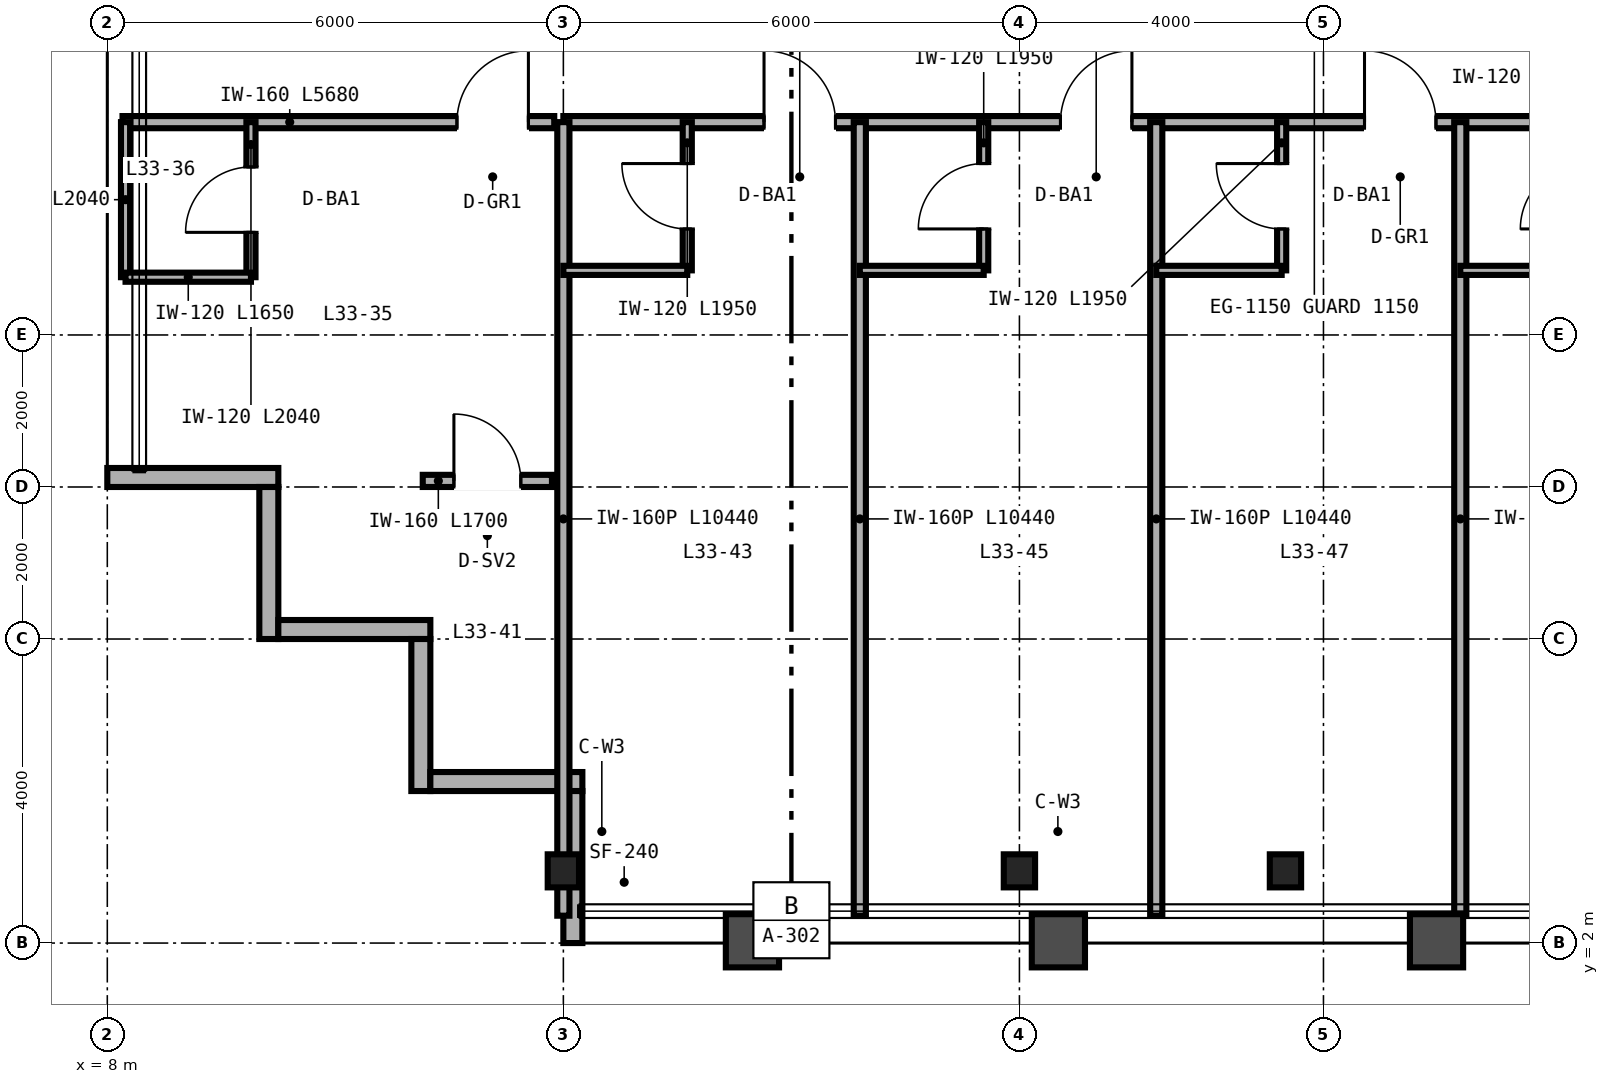
"""IFC4 building model, lengths in metres.
Left out: names, types, materials, properties, quantities, classifications, styles, units other than length and angle.
Written with IfcOpenShell. Run it as: python <this file> out.ifc"""

import sys

from ifc_helpers import new_model, si_unit, direction, frame, frame_2d, origin, origin_2d, place, context, subcontext, project, spatial, rectangle, i_section, extrude, source, transform, mapped, element, fill, save


model = new_model("IFC4")
c1 = context("Model", 3, precision=1e-05, world=origin(), true_north=direction((0.0, 1.0)))
c2 = subcontext(c1, "Body", "Model", "MODEL_VIEW")
j1 = project(units=[si_unit("LENGTHUNIT", "METRE"), si_unit("PLANEANGLEUNIT", "RADIAN")], contexts=[c1])
p1 = place(None, origin())
s1 = spatial("IfcSite", under=j1, at=p1, CompositionType="ELEMENT")
p2 = place(p1, origin())
s2 = spatial("IfcBuilding", under=s1, at=p2, CompositionType="ELEMENT")
p3 = place(p2, frame((0.0, 0.0, 133.2)))
s3 = spatial("IfcBuildingStorey", under=s2, at=p3, CompositionType="ELEMENT", Elevation=133.2)
m1 = source(origin(), c2, "Body", "SweptSolid", [
    extrude(i_section(OverallWidth=0.412, OverallDepth=0.435, WebThickness=0.036, FlangeThickness=0.057, FilletRadius=0.025, at=origin_2d()), origin(), (0.0, 0.0, 1.0), 3.36),
])
for number, where, z_axis, x_axis in (
    (1, (14.0, 2.95, 0.0), (0.0, 0.0, 1.0), (1.0, 0.0, 0.0)),
    (2, (20.0, 2.95, 0.0), (0.0, 0.0, 1.0), (1.0, 0.0, 0.0)),
    (3, (23.5, 2.95, 0.0), (0.0, 0.0, 1.0), (1.0, 0.0, 0.0)),
):
    element("IfcColumn", number, at=place(p3, frame(where, z_axis=z_axis, x_axis=x_axis)), inside=s3, PredefinedType="COLUMN", context=c2, shape_type="MappedRepresentation", body=[
        mapped(m1, transform((0.0, 0.0, 0.0), scale=1.0)),
    ])
p4 = place(p3, frame((8.0, 8.125, 0.0), z_axis=(0.0, 0.0, 1.0), x_axis=(1.0, 0.0, 0.0)))
e4 = element("IfcWall", 4, at=p4, inside=s3, PredefinedType="SOLIDWALL", context=c2, shape_type="SweptSolid", body=[
    extrude(rectangle(XDim=2.25, YDim=0.25, at=frame_2d((1.125, 0.0))), origin(), (0.0, 0.0, 1.0), 3.36),
])
for number, where, z_axis, x_axis in (
    (5, (10.125, 8.0, 0.0), (0.0, 0.0, 1.0), (0.0, -1.0, 0.0)),
    (6, (10.25, 6.125, 0.0), (0.0, 0.0, 1.0), (1.0, 0.0, 0.0)),
    (7, (12.125, 6.0, 0.0), (0.0, 0.0, 1.0), (0.0, -1.0, 0.0)),
    (8, (12.25, 4.125, 0.0), (0.0, 0.0, 1.0), (1.0, 0.0, 0.0)),
):
    element("IfcWall", number, at=place(p3, frame(where, z_axis=z_axis, x_axis=x_axis)), inside=s3, PredefinedType="SOLIDWALL", context=c2, shape_type="SweptSolid", body=[
        extrude(rectangle(XDim=2.0, YDim=0.25, at=frame_2d((1.0, 0.0))), origin(), (0.0, 0.0, 1.0), 3.36),
    ])
p5 = place(p3, frame((14.125, 4.0, 0.0), z_axis=(0.0, 0.0, 1.0), x_axis=(0.0, -1.0, 0.0)))
e9 = element("IfcWall", 9, at=p5, inside=s3, PredefinedType="SOLIDWALL", context=c2, shape_type="SweptSolid", body=[
    extrude(rectangle(XDim=2.0, YDim=0.25, at=frame_2d((1.0, 0.0))), origin(), (0.0, 0.0, 1.0), 2.667),
])
p6 = place(p3, frame((8.2, 12.8, 0.0), z_axis=(0.0, 0.0, 1.0), x_axis=(1.0, 0.0, 0.0)))
e10 = element("IfcWall", 10, at=p6, inside=s3, PredefinedType="PARTITIONING", context=c2, shape_type="SweptSolid", body=[
    extrude(rectangle(XDim=5.68, YDim=0.16, at=frame_2d((2.84, 0.0))), origin(), (0.0, 0.0, 1.0), 3.36),
])
p7 = place(p6, frame((4.4, 0.0, 0.0)))
e11 = element("IfcOpeningElement", 11, at=p7, cuts=e10, PredefinedType="OPENING", context=c2, shape_type="SweptSolid", body=[
    extrude(rectangle(XDim=0.94, YDim=2.15, at=frame_2d((0.47, 1.075))), frame((0.0, 0.09, 0.0), z_axis=(0.0, -1.0, 0.0), x_axis=(1.0, 0.0, 0.0)), (0.0, 0.0, 1.0), 0.18),
])
p8 = place(p3, frame((9.89, 10.76, 0.0), z_axis=(0.0, 0.0, 1.0), x_axis=(0.0, 1.0, 0.0)))
e12 = element("IfcWall", 12, at=p8, inside=s3, PredefinedType="PARTITIONING", context=c2, shape_type="SweptSolid", body=[
    extrude(rectangle(XDim=2.04, YDim=0.12, at=frame_2d((1.02, 0.0))), origin(), (0.0, 0.0, 1.0), 3.36),
])
p9 = place(p8, frame((0.59, 0.0, 0.0)))
e13 = element("IfcOpeningElement", 13, at=p9, cuts=e12, PredefinedType="OPENING", context=c2, shape_type="SweptSolid", body=[
    extrude(rectangle(XDim=0.86, YDim=2.1, at=frame_2d((0.43, 1.05))), frame((0.0, 0.07, 0.0), z_axis=(0.0, -1.0, 0.0), x_axis=(1.0, 0.0, 0.0)), (0.0, 0.0, 1.0), 0.14),
])
p10 = place(p3, frame((8.24, 10.76, 0.0), z_axis=(0.0, 0.0, 1.0), x_axis=(0.0, 1.0, 0.0)))
e14 = element("IfcWall", 14, at=p10, inside=s3, PredefinedType="PARTITIONING", context=c2, shape_type="SweptSolid", body=[
    extrude(rectangle(XDim=2.04, YDim=0.12, at=frame_2d((1.02, 0.0))), origin(), (0.0, 0.0, 1.0), 3.36),
])
p11 = place(p3, frame((8.24, 10.76, 0.0), z_axis=(0.0, 0.0, 1.0), x_axis=(1.0, 0.0, 0.0)))
e15 = element("IfcWall", 15, at=p11, inside=s3, PredefinedType="PARTITIONING", context=c2, shape_type="SweptSolid", body=[
    extrude(rectangle(XDim=1.65, YDim=0.12, at=frame_2d((0.825, 0.0))), origin(), (0.0, 0.0, 1.0), 3.36),
])
p12 = place(p3, frame((12.15, 8.08, 0.0), z_axis=(0.0, 0.0, 1.0), x_axis=(1.0, 0.0, 0.0)))
e16 = element("IfcWall", 16, at=p12, inside=s3, PredefinedType="PARTITIONING", context=c2, shape_type="SweptSolid", body=[
    extrude(rectangle(XDim=1.7, YDim=0.16, at=frame_2d((0.85, 0.0))), origin(), (0.0, 0.0, 1.0), 3.36),
])
p13 = place(p12, frame((0.41, 0.0, 0.0)))
e17 = element("IfcOpeningElement", 17, at=p13, cuts=e16, PredefinedType="OPENING", context=c2, shape_type="SweptSolid", body=[
    extrude(rectangle(XDim=0.88, YDim=2.15, at=frame_2d((0.44, 1.075))), frame((0.0, 0.09, 0.0), z_axis=(0.0, -1.0, 0.0), x_axis=(1.0, 0.0, 0.0)), (0.0, 0.0, 1.0), 0.18),
])
p14 = place(p3, frame((14.0, 12.8, 0.0), z_axis=(0.0, 0.0, 1.0), x_axis=(1.0, 0.0, 0.0)))
e18 = element("IfcWall", 18, at=p14, inside=s3, PredefinedType="PARTITIONING", context=c2, shape_type="SweptSolid", body=[
    extrude(rectangle(XDim=36.0, YDim=0.16, at=frame_2d((18.0, 0.0))), origin(), (0.0, 0.0, 1.0), 2.581),
])
p15 = place(p14, frame((2.64, 0.0, 0.0)))
e19 = element("IfcOpeningElement", 19, at=p15, cuts=e18, PredefinedType="OPENING", context=c2, shape_type="SweptSolid", body=[
    extrude(rectangle(XDim=0.94, YDim=2.15, at=frame_2d((0.47, 1.075))), frame((0.0, 0.09, 0.0), z_axis=(0.0, -1.0, 0.0), x_axis=(1.0, 0.0, 0.0)), (0.0, 0.0, 1.0), 0.18),
])
p16 = place(p14, frame((6.54, 0.0, 0.0)))
e20 = element("IfcOpeningElement", 20, at=p16, cuts=e18, PredefinedType="OPENING", context=c2, shape_type="SweptSolid", body=[
    extrude(rectangle(XDim=0.94, YDim=2.15, at=frame_2d((0.47, 1.075))), frame((0.0, 0.09, 0.0), z_axis=(0.0, -1.0, 0.0), x_axis=(1.0, 0.0, 0.0)), (0.0, 0.0, 1.0), 0.18),
])
p17 = place(p14, frame((10.54, 0.0, 0.0)))
e21 = element("IfcOpeningElement", 21, at=p17, cuts=e18, PredefinedType="OPENING", context=c2, shape_type="SweptSolid", body=[
    extrude(rectangle(XDim=0.94, YDim=2.15, at=frame_2d((0.47, 1.075))), frame((0.0, 0.09, 0.0), z_axis=(0.0, -1.0, 0.0), x_axis=(1.0, 0.0, 0.0)), (0.0, 0.0, 1.0), 0.18),
])
p18 = place(p14, frame((14.54, 0.0, 0.0)))
e22 = element("IfcOpeningElement", 22, at=p18, cuts=e18, PredefinedType="OPENING", context=c2, shape_type="SweptSolid", body=[
    extrude(rectangle(XDim=0.94, YDim=2.15, at=frame_2d((0.47, 1.075))), frame((0.0, 0.09, 0.0), z_axis=(0.0, -1.0, 0.0), x_axis=(1.0, 0.0, 0.0)), (0.0, 0.0, 1.0), 0.18),
])
p19 = place(p14, frame((18.54, 0.0, 0.0)))
e23 = element("IfcOpeningElement", 23, at=p19, cuts=e18, PredefinedType="OPENING", context=c2, shape_type="SweptSolid", body=[
    extrude(rectangle(XDim=0.94, YDim=2.15, at=frame_2d((0.47, 1.075))), frame((0.0, 0.09, 0.0), z_axis=(0.0, -1.0, 0.0), x_axis=(1.0, 0.0, 0.0)), (0.0, 0.0, 1.0), 0.18),
])
p20 = place(p14, frame((22.54, 0.0, 0.0)))
e24 = element("IfcOpeningElement", 24, at=p20, cuts=e18, PredefinedType="OPENING", context=c2, shape_type="SweptSolid", body=[
    extrude(rectangle(XDim=0.94, YDim=2.15, at=frame_2d((0.47, 1.075))), frame((0.0, 0.09, 0.0), z_axis=(0.0, -1.0, 0.0), x_axis=(1.0, 0.0, 0.0)), (0.0, 0.0, 1.0), 0.18),
])
p21 = place(p14, frame((26.54, 0.0, 0.0)))
e25 = element("IfcOpeningElement", 25, at=p21, cuts=e18, PredefinedType="OPENING", context=c2, shape_type="SweptSolid", body=[
    extrude(rectangle(XDim=0.94, YDim=2.15, at=frame_2d((0.47, 1.075))), frame((0.0, 0.09, 0.0), z_axis=(0.0, -1.0, 0.0), x_axis=(1.0, 0.0, 0.0)), (0.0, 0.0, 1.0), 0.18),
])
p22 = place(p14, frame((30.64, 0.0, 0.0)))
e26 = element("IfcOpeningElement", 26, at=p22, cuts=e18, PredefinedType="OPENING", context=c2, shape_type="SweptSolid", body=[
    extrude(rectangle(XDim=0.94, YDim=2.15, at=frame_2d((0.47, 1.075))), frame((0.0, 0.09, 0.0), z_axis=(0.0, -1.0, 0.0), x_axis=(1.0, 0.0, 0.0)), (0.0, 0.0, 1.0), 0.18),
])
p23 = place(p14, frame((34.74, 0.0, 0.0)))
e27 = element("IfcOpeningElement", 27, at=p23, cuts=e18, PredefinedType="OPENING", context=c2, shape_type="SweptSolid", body=[
    extrude(rectangle(XDim=0.94, YDim=2.15, at=frame_2d((0.47, 1.075))), frame((0.0, 0.09, 0.0), z_axis=(0.0, -1.0, 0.0), x_axis=(1.0, 0.0, 0.0)), (0.0, 0.0, 1.0), 0.18),
])
for number, where, z_axis, x_axis in (
    (28, (14.0, 2.36, 0.0), (0.0, 0.0, 1.0), (0.0, 1.0, 0.0)),
    (29, (17.9, 2.36, 0.0), (0.0, 0.0, 1.0), (0.0, 1.0, 0.0)),
):
    element("IfcWall", number, at=place(p3, frame(where, z_axis=z_axis, x_axis=x_axis)), inside=s3, PredefinedType="PARTITIONING", context=c2, shape_type="SweptSolid", body=[
        extrude(rectangle(XDim=10.44, YDim=0.16, at=frame_2d((5.22, 0.0))), origin(), (0.0, 0.0, 1.0), 2.667),
    ])
p24 = place(p3, frame((15.63, 10.85, 0.0), z_axis=(0.0, 0.0, 1.0), x_axis=(0.0, 1.0, 0.0)))
e30 = element("IfcWall", 30, at=p24, inside=s3, PredefinedType="PARTITIONING", context=c2, shape_type="SweptSolid", body=[
    extrude(rectangle(XDim=1.95, YDim=0.12, at=frame_2d((0.975, 0.0))), origin(), (0.0, 0.0, 1.0), 3.36),
])
p25 = place(p24, frame((0.545, 0.0, 0.0)))
e31 = element("IfcOpeningElement", 31, at=p25, cuts=e30, PredefinedType="OPENING", context=c2, shape_type="SweptSolid", body=[
    extrude(rectangle(XDim=0.86, YDim=2.1, at=frame_2d((0.43, 1.05))), frame((0.0, 0.07, 0.0), z_axis=(0.0, -1.0, 0.0), x_axis=(1.0, 0.0, 0.0)), (0.0, 0.0, 1.0), 0.14),
])
p26 = place(p3, frame((14.0, 10.85, 0.0), z_axis=(0.0, 0.0, 1.0), x_axis=(1.0, 0.0, 0.0)))
e32 = element("IfcWall", 32, at=p26, inside=s3, PredefinedType="PARTITIONING", context=c2, shape_type="SweptSolid", body=[
    extrude(rectangle(XDim=1.63, YDim=0.12, at=frame_2d((0.815, 0.0))), origin(), (0.0, 0.0, 1.0), 3.36),
])
p27 = place(p3, frame((21.8, 2.36, 0.0), z_axis=(0.0, 0.0, 1.0), x_axis=(0.0, 1.0, 0.0)))
e33 = element("IfcWall", 33, at=p27, inside=s3, PredefinedType="PARTITIONING", context=c2, shape_type="SweptSolid", body=[
    extrude(rectangle(XDim=10.44, YDim=0.16, at=frame_2d((5.22, 0.0))), origin(), (0.0, 0.0, 1.0), 2.823),
])
p28 = place(p3, frame((19.53, 10.85, 0.0), z_axis=(0.0, 0.0, 1.0), x_axis=(0.0, 1.0, 0.0)))
e34 = element("IfcWall", 34, at=p28, inside=s3, PredefinedType="PARTITIONING", context=c2, shape_type="SweptSolid", body=[
    extrude(rectangle(XDim=1.95, YDim=0.12, at=frame_2d((0.975, 0.0))), origin(), (0.0, 0.0, 1.0), 3.36),
])
p29 = place(p28, frame((0.545, 0.0, 0.0)))
e35 = element("IfcOpeningElement", 35, at=p29, cuts=e34, PredefinedType="OPENING", context=c2, shape_type="SweptSolid", body=[
    extrude(rectangle(XDim=0.86, YDim=2.1, at=frame_2d((0.43, 1.05))), frame((0.0, 0.07, 0.0), z_axis=(0.0, -1.0, 0.0), x_axis=(1.0, 0.0, 0.0)), (0.0, 0.0, 1.0), 0.14),
])
p30 = place(p3, frame((17.9, 10.85, 0.0), z_axis=(0.0, 0.0, 1.0), x_axis=(1.0, 0.0, 0.0)))
e36 = element("IfcWall", 36, at=p30, inside=s3, PredefinedType="PARTITIONING", context=c2, shape_type="SweptSolid", body=[
    extrude(rectangle(XDim=1.63, YDim=0.12, at=frame_2d((0.815, 0.0))), origin(), (0.0, 0.0, 1.0), 3.36),
])
p31 = place(p3, frame((25.8, 2.36, 0.0), z_axis=(0.0, 0.0, 1.0), x_axis=(0.0, 1.0, 0.0)))
e37 = element("IfcWall", 37, at=p31, inside=s3, PredefinedType="PARTITIONING", context=c2, shape_type="SweptSolid", body=[
    extrude(rectangle(XDim=10.44, YDim=0.16, at=frame_2d((5.22, 0.0))), origin(), (0.0, 0.0, 1.0), 2.433),
])
p32 = place(p3, frame((23.45, 10.85, 0.0), z_axis=(0.0, 0.0, 1.0), x_axis=(0.0, 1.0, 0.0)))
e38 = element("IfcWall", 38, at=p32, inside=s3, PredefinedType="PARTITIONING", context=c2, shape_type="SweptSolid", body=[
    extrude(rectangle(XDim=1.95, YDim=0.12, at=frame_2d((0.975, 0.0))), origin(), (0.0, 0.0, 1.0), 2.581),
])
p33 = place(p32, frame((0.545, 0.0, 0.0)))
e39 = element("IfcOpeningElement", 39, at=p33, cuts=e38, PredefinedType="OPENING", context=c2, shape_type="SweptSolid", body=[
    extrude(rectangle(XDim=0.86, YDim=2.1, at=frame_2d((0.43, 1.05))), frame((0.0, 0.07, 0.0), z_axis=(0.0, -1.0, 0.0), x_axis=(1.0, 0.0, 0.0)), (0.0, 0.0, 1.0), 0.14),
])
p34 = place(p3, frame((21.8, 10.85, 0.0), z_axis=(0.0, 0.0, 1.0), x_axis=(1.0, 0.0, 0.0)))
e40 = element("IfcWall", 40, at=p34, inside=s3, PredefinedType="PARTITIONING", context=c2, shape_type="SweptSolid", body=[
    extrude(rectangle(XDim=1.65, YDim=0.12, at=frame_2d((0.825, 0.0))), origin(), (0.0, 0.0, 1.0), 2.581),
])
p35 = place(p3, frame((25.8, 10.85, 0.0), z_axis=(0.0, 0.0, 1.0), x_axis=(1.0, 0.0, 0.0)))
e41 = element("IfcWall", 41, at=p35, inside=s3, PredefinedType="PARTITIONING", context=c2, shape_type="SweptSolid", body=[
    extrude(rectangle(XDim=1.65, YDim=0.12, at=frame_2d((0.825, 0.0))), origin(), (0.0, 0.0, 1.0), 3.36),
])
m2 = source(origin(), c2, "Body", "SweptSolid", [
    extrude(rectangle(XDim=0.86, YDim=2.1, at=frame_2d((0.43, 1.05))), frame((0.0, 0.025, 0.0), z_axis=(0.0, -1.0, 0.0), x_axis=(1.0, 0.0, 0.0)), (0.0, 0.0, 1.0), 0.05),
])
p36 = place(p9, origin())
e42 = element("IfcDoor", 42, at=p36, inside=s3, OperationType="SINGLE_SWING_LEFT", PredefinedType="DOOR", context=c2, shape_type="MappedRepresentation", body=[
    mapped(m2, transform((0.0, 0.0, 0.0), scale=1.0)),
])
fill(e13, e42)
m3 = source(origin(), c2, "Body", "SweptSolid", [
    extrude(rectangle(XDim=0.94, YDim=2.15, at=frame_2d((0.47, 1.075))), frame((0.0, 0.025, 0.0), z_axis=(0.0, -1.0, 0.0), x_axis=(1.0, 0.0, 0.0)), (0.0, 0.0, 1.0), 0.05),
])
p37 = place(p7, origin())
e43 = element("IfcDoor", 43, at=p37, inside=s3, OperationType="SINGLE_SWING_RIGHT", PredefinedType="DOOR", context=c2, shape_type="MappedRepresentation", body=[
    mapped(m3, transform((0.0, 0.0, 0.0), scale=1.0)),
])
fill(e11, e43)
m4 = source(origin(), c2, "Body", "SweptSolid", [
    extrude(rectangle(XDim=0.88, YDim=2.15, at=frame_2d((0.44, 1.075))), frame((0.0, 0.025, 0.0), z_axis=(0.0, -1.0, 0.0), x_axis=(1.0, 0.0, 0.0)), (0.0, 0.0, 1.0), 0.05),
])
p38 = place(p13, origin())
e44 = element("IfcDoor", 44, at=p38, inside=s3, OperationType="SINGLE_SWING_LEFT", PredefinedType="DOOR", context=c2, shape_type="MappedRepresentation", body=[
    mapped(m4, transform((0.0, 0.0, 0.0), scale=1.0)),
])
fill(e17, e44)
p39 = place(p25, origin())
e45 = element("IfcDoor", 45, at=p39, inside=s3, OperationType="SINGLE_SWING_RIGHT", PredefinedType="DOOR", context=c2, shape_type="MappedRepresentation", body=[
    mapped(m2, transform((0.0, 0.0, 0.0), scale=1.0)),
])
fill(e31, e45)
p40 = place(p29, origin())
e46 = element("IfcDoor", 46, at=p40, inside=s3, OperationType="SINGLE_SWING_LEFT", PredefinedType="DOOR", context=c2, shape_type="MappedRepresentation", body=[
    mapped(m2, transform((0.0, 0.0, 0.0), scale=1.0)),
])
fill(e35, e46)
p41 = place(p33, origin())
e47 = element("IfcDoor", 47, at=p41, inside=s3, OperationType="SINGLE_SWING_RIGHT", PredefinedType="DOOR", context=c2, shape_type="MappedRepresentation", body=[
    mapped(m2, transform((0.0, 0.0, 0.0), scale=1.0)),
])
fill(e39, e47)
p42 = place(p15, origin())
e48 = element("IfcDoor", 48, at=p42, inside=s3, OperationType="SINGLE_SWING_LEFT", PredefinedType="DOOR", context=c2, shape_type="MappedRepresentation", body=[
    mapped(m3, transform((0.0, 0.0, 0.0), scale=1.0)),
])
fill(e19, e48)
p43 = place(p16, origin())
e49 = element("IfcDoor", 49, at=p43, inside=s3, OperationType="SINGLE_SWING_RIGHT", PredefinedType="DOOR", context=c2, shape_type="MappedRepresentation", body=[
    mapped(m3, transform((0.0, 0.0, 0.0), scale=1.0)),
])
fill(e20, e49)
p44 = place(p17, origin())
e50 = element("IfcDoor", 50, at=p44, inside=s3, OperationType="SINGLE_SWING_LEFT", PredefinedType="DOOR", context=c2, shape_type="MappedRepresentation", body=[
    mapped(m3, transform((0.0, 0.0, 0.0), scale=1.0)),
])
fill(e21, e50)
save(model, sys.argv[1])
